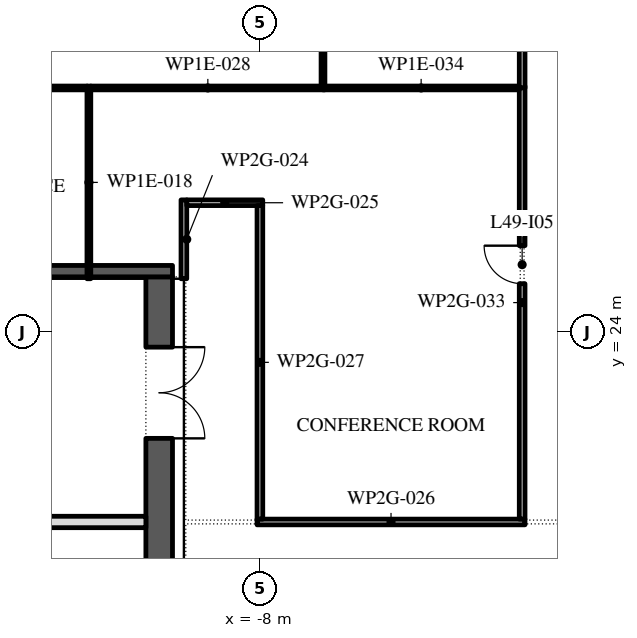
"""IFC4 building model, lengths in metres.
Left out: names, types, materials, properties, quantities, classifications, styles, units other than length and angle.
Written with IfcOpenShell. Run it as: python <this file> out.ifc"""

import sys

from ifc_helpers import new_model, si_unit, direction, frame, frame_2d, origin, place, context, subcontext, project, spatial, rectangle, extrude, element, fill, save


model = new_model("IFC4")
c1 = context("Model", 3, precision=1e-05, world=origin(), true_north=direction((0.0, 1.0)))
c2 = subcontext(c1, "Body", "Model", "MODEL_VIEW")
j1 = project(units=[si_unit("LENGTHUNIT", "METRE"), si_unit("PLANEANGLEUNIT", "RADIAN")], contexts=[c1])
p1 = place(None, origin())
s1 = spatial("IfcSite", under=j1, at=p1, CompositionType="ELEMENT")
p2 = place(p1, origin())
s2 = spatial("IfcBuilding", under=s1, at=p2, CompositionType="ELEMENT")
p3 = place(p2, frame((0.0, 0.0, 222.0)))
s3 = spatial("IfcBuildingStorey", under=s2, at=p3, CompositionType="ELEMENT", Elevation=222.0)
p4 = place(p3, frame((-10.65, -2.45, 0.0), z_axis=(0.0, 0.0, 1.0), x_axis=(0.0, 1.0, 0.0)))
e1 = element("IfcWall", 1, at=p4, inside=s3, PredefinedType="SHEAR", context=c2, shape_type="SweptSolid", body=[
    extrude(rectangle(XDim=27.9, YDim=0.7, at=frame_2d((13.95, 0.0))), origin(), (0.0, 0.0, 1.0), 3.75),
])
p5 = place(p4, frame((23.65, 0.0, 0.0)))
e2 = element("IfcOpeningElement", 2, at=p5, cuts=e1, PredefinedType="OPENING", context=c2, shape_type="SweptSolid", body=[
    extrude(rectangle(XDim=2.4, YDim=2.1, at=frame_2d((1.2, 1.05))), frame((0.0, 0.36, 0.0), z_axis=(0.0, -1.0, 0.0), x_axis=(1.0, 0.0, 0.0)), (0.0, 0.0, 1.0), 0.72),
])
p6 = place(p4, frame((1.387, 0.0, 0.0)))
e3 = element("IfcOpeningElement", 3, at=p6, cuts=e1, PredefinedType="OPENING", context=c2, shape_type="SweptSolid", body=[
    extrude(rectangle(XDim=0.9, YDim=2.1, at=frame_2d((0.45, 1.05))), frame((0.0, 0.36, 0.0), z_axis=(0.0, -1.0, 0.0), x_axis=(1.0, 0.0, 0.0)), (0.0, 0.0, 1.0), 0.72),
])
p7 = place(p4, frame((4.562, 0.0, 0.0)))
e4 = element("IfcOpeningElement", 4, at=p7, cuts=e1, PredefinedType="OPENING", context=c2, shape_type="SweptSolid", body=[
    extrude(rectangle(XDim=1.0, YDim=2.1, at=frame_2d((0.5, 1.05))), frame((0.0, 0.36, 0.0), z_axis=(0.0, -1.0, 0.0), x_axis=(1.0, 0.0, 0.0)), (0.0, 0.0, 1.0), 0.72),
])
p8 = place(p3, frame((-21.7, 25.6, 0.0), z_axis=(0.0, 0.0, 1.0), x_axis=(1.0, 0.0, 0.0)))
e5 = element("IfcWall", 5, at=p8, inside=s3, PredefinedType="SHEAR", context=c2, shape_type="SweptSolid", body=[
    extrude(rectangle(XDim=11.4, YDim=0.3, at=frame_2d((5.7, 0.0))), origin(), (0.0, 0.0, 1.0), 3.75),
])
p9 = place(p3, frame((-14.0, 19.0, 0.0), z_axis=(0.0, 0.0, 1.0), x_axis=(1.0, 0.0, 0.0)))
e6 = element("IfcWall", 6, at=p9, inside=s3, PredefinedType="PARTITIONING", context=c2, shape_type="SweptSolid", body=[
    extrude(rectangle(XDim=3.0, YDim=0.3, at=frame_2d((1.5, 0.0))), origin(), (0.0, 0.0, 1.0), 3.75),
])
p10 = place(p3, frame((-12.5, 25.4, 0.0), z_axis=(0.0, 0.0, 1.0), x_axis=(0.0, 1.0, 0.0)))
e7 = element("IfcWall", 7, at=p10, inside=s3, PredefinedType="PARTITIONING", context=c2, shape_type="SweptSolid", body=[
    extrude(rectangle(XDim=5.07, YDim=0.1, at=frame_2d((2.535, 0.0))), origin(), (0.0, 0.0, 1.0), 3.75),
])
p11 = place(p3, frame((-12.55, 30.42, 0.0), z_axis=(0.0, 0.0, 1.0), x_axis=(-1.0, 0.0, 0.0)))
e8 = element("IfcWall", 8, at=p11, inside=s3, PredefinedType="PARTITIONING", context=c2, shape_type="SweptSolid", body=[
    extrude(rectangle(XDim=9.97, YDim=0.1, at=frame_2d((4.985, 0.0))), origin(), (0.0, 0.0, 1.0), 3.75),
])
p12 = place(p11, frame((4.4, 0.0, 0.0)))
e9 = element("IfcOpeningElement", 9, at=p12, cuts=e8, PredefinedType="OPENING", context=c2, shape_type="SweptSolid", body=[
    extrude(rectangle(XDim=0.9, YDim=2.1, at=frame_2d((0.45, 1.05))), frame((0.0, 0.06, 0.0), z_axis=(0.0, -1.0, 0.0), x_axis=(1.0, 0.0, 0.0)), (0.0, 0.0, 1.0), 0.12),
])
p13 = place(p3, frame((-10.0, 25.4, 0.0), z_axis=(0.0, 0.0, 1.0), x_axis=(0.0, 1.0, 0.0)))
e10 = element("IfcWall", 10, at=p13, inside=s3, PredefinedType="PARTITIONING", context=c2, shape_type="SweptSolid", body=[
    extrude(rectangle(XDim=2.075, YDim=0.15, at=frame_2d((1.038, 0.0))), origin(), (0.0, 0.0, 1.0), 3.75),
])
p14 = place(p3, frame((-9.925, 27.4, 0.0), z_axis=(0.0, 0.0, 1.0), x_axis=(1.0, 0.0, 0.0)))
e11 = element("IfcWall", 11, at=p14, inside=s3, PredefinedType="PARTITIONING", context=c2, shape_type="SweptSolid", body=[
    extrude(rectangle(XDim=2.0, YDim=0.15, at=frame_2d((1.0, 0.0))), origin(), (0.0, 0.0, 1.0), 3.75),
])
p15 = place(p3, frame((-8.075, 19.0, 0.0), z_axis=(0.0, 0.0, 1.0), x_axis=(1.0, 0.0, 0.0)))
e12 = element("IfcWall", 12, at=p15, inside=s3, PredefinedType="PARTITIONING", context=c2, shape_type="SweptSolid", body=[
    extrude(rectangle(XDim=7.05, YDim=0.15, at=frame_2d((3.525, 0.0))), origin(), (0.0, 0.0, 1.0), 3.75),
])
p16 = place(p3, frame((-8.0, 27.325, 0.0), z_axis=(0.0, 0.0, 1.0), x_axis=(0.0, -1.0, 0.0)))
e13 = element("IfcWall", 13, at=p16, inside=s3, PredefinedType="PARTITIONING", context=c2, shape_type="SweptSolid", body=[
    extrude(rectangle(XDim=8.25, YDim=0.15, at=frame_2d((4.125, 0.0))), origin(), (0.0, 0.0, 1.0), 3.75),
])
p17 = place(p3, frame((-6.29, 30.42, 0.0), z_axis=(0.0, 0.0, 1.0), x_axis=(-1.0, 0.0, 0.0)))
e14 = element("IfcWall", 14, at=p17, inside=s3, PredefinedType="PARTITIONING", context=c2, shape_type="SweptSolid", body=[
    extrude(rectangle(XDim=6.16, YDim=0.1, at=frame_2d((3.08, 0.0))), origin(), (0.0, 0.0, 1.0), 3.75),
])
p18 = place(p3, frame((-6.34, 30.47, 0.0), z_axis=(0.0, 0.0, 1.0), x_axis=(0.0, 1.0, 0.0)))
e15 = element("IfcWall", 15, at=p18, inside=s3, PredefinedType="PARTITIONING", context=c2, shape_type="SweptSolid", body=[
    extrude(rectangle(XDim=9.591, YDim=0.1, at=frame_2d((4.795, 0.0))), origin(), (0.0, 0.0, 1.0), 3.75),
])
p19 = place(p3, frame((-1.1, 19.075, 0.0), z_axis=(0.0, 0.0, 1.0), x_axis=(0.0, 1.0, 0.0)))
e16 = element("IfcWall", 16, at=p19, inside=s3, PredefinedType="PARTITIONING", context=c2, shape_type="SweptSolid", body=[
    extrude(rectangle(XDim=11.395, YDim=0.15, at=frame_2d((5.698, 0.0))), origin(), (0.0, 0.0, 1.0), 3.75),
])
p20 = place(p19, frame((6.195, 0.0, 0.0)))
e17 = element("IfcOpeningElement", 17, at=p20, cuts=e16, PredefinedType="OPENING", context=c2, shape_type="SweptSolid", body=[
    extrude(rectangle(XDim=1.0, YDim=2.1, at=frame_2d((0.5, 1.05))), frame((0.0, 0.085, 0.0), z_axis=(0.0, -1.0, 0.0), x_axis=(1.0, 0.0, 0.0)), (0.0, 0.0, 1.0), 0.17),
])
p21 = place(p3, frame((-1.175, 30.42, 0.0), z_axis=(0.0, 0.0, 1.0), x_axis=(-1.0, 0.0, 0.0)))
e18 = element("IfcWall", 18, at=p21, inside=s3, PredefinedType="PARTITIONING", context=c2, shape_type="SweptSolid", body=[
    extrude(rectangle(XDim=5.165, YDim=0.1, at=frame_2d((2.583, 0.0))), origin(), (0.0, 0.0, 1.0), 3.75),
])
p22 = place(p3, frame((-1.1, 30.42, 0.0), z_axis=(0.0, 0.0, 1.0), x_axis=(0.0, 1.0, 0.0)))
e19 = element("IfcWall", 19, at=p22, inside=s3, PredefinedType="PARTITIONING", context=c2, shape_type="SweptSolid", body=[
    extrude(rectangle(XDim=10.85, YDim=0.15, at=frame_2d((5.425, 0.0))), origin(), (0.0, 0.0, 1.0), 3.75),
])
p23 = place(p22, frame((3.93, 0.0, 0.0)))
e20 = element("IfcOpeningElement", 20, at=p23, cuts=e19, PredefinedType="OPENING", context=c2, shape_type="SweptSolid", body=[
    extrude(rectangle(XDim=1.0, YDim=2.1, at=frame_2d((0.5, 1.05))), frame((0.0, 0.085, 0.0), z_axis=(0.0, -1.0, 0.0), x_axis=(1.0, 0.0, 0.0)), (0.0, 0.0, 1.0), 0.17),
])
p24 = place(p5, frame((2.4, 0.0, 0.0), z_axis=(0.0, 0.0, 1.0), x_axis=(-1.0, 0.0, 0.0)))
e21 = element("IfcDoor", 21, at=p24, inside=s3, OperationType="DOUBLE_DOOR_SINGLE_SWING", PredefinedType="DOOR", context=c2, shape_type="SweptSolid", body=[
    extrude(rectangle(XDim=2.4, YDim=2.1, at=frame_2d((1.2, 1.05))), frame((0.0, 0.025, 0.0), z_axis=(0.0, -1.0, 0.0), x_axis=(1.0, 0.0, 0.0)), (0.0, 0.0, 1.0), 0.05),
])
fill(e2, e21)
p25 = place(p20, origin())
e22 = element("IfcDoor", 22, at=p25, inside=s3, OperationType="SINGLE_SWING_LEFT", PredefinedType="DOOR", context=c2, shape_type="SweptSolid", body=[
    extrude(rectangle(XDim=1.0, YDim=2.1, at=frame_2d((0.5, 1.05))), frame((0.0, 0.025, 0.0), z_axis=(0.0, -1.0, 0.0), x_axis=(1.0, 0.0, 0.0)), (0.0, 0.0, 1.0), 0.05),
])
fill(e17, e22)
save(model, sys.argv[1])
